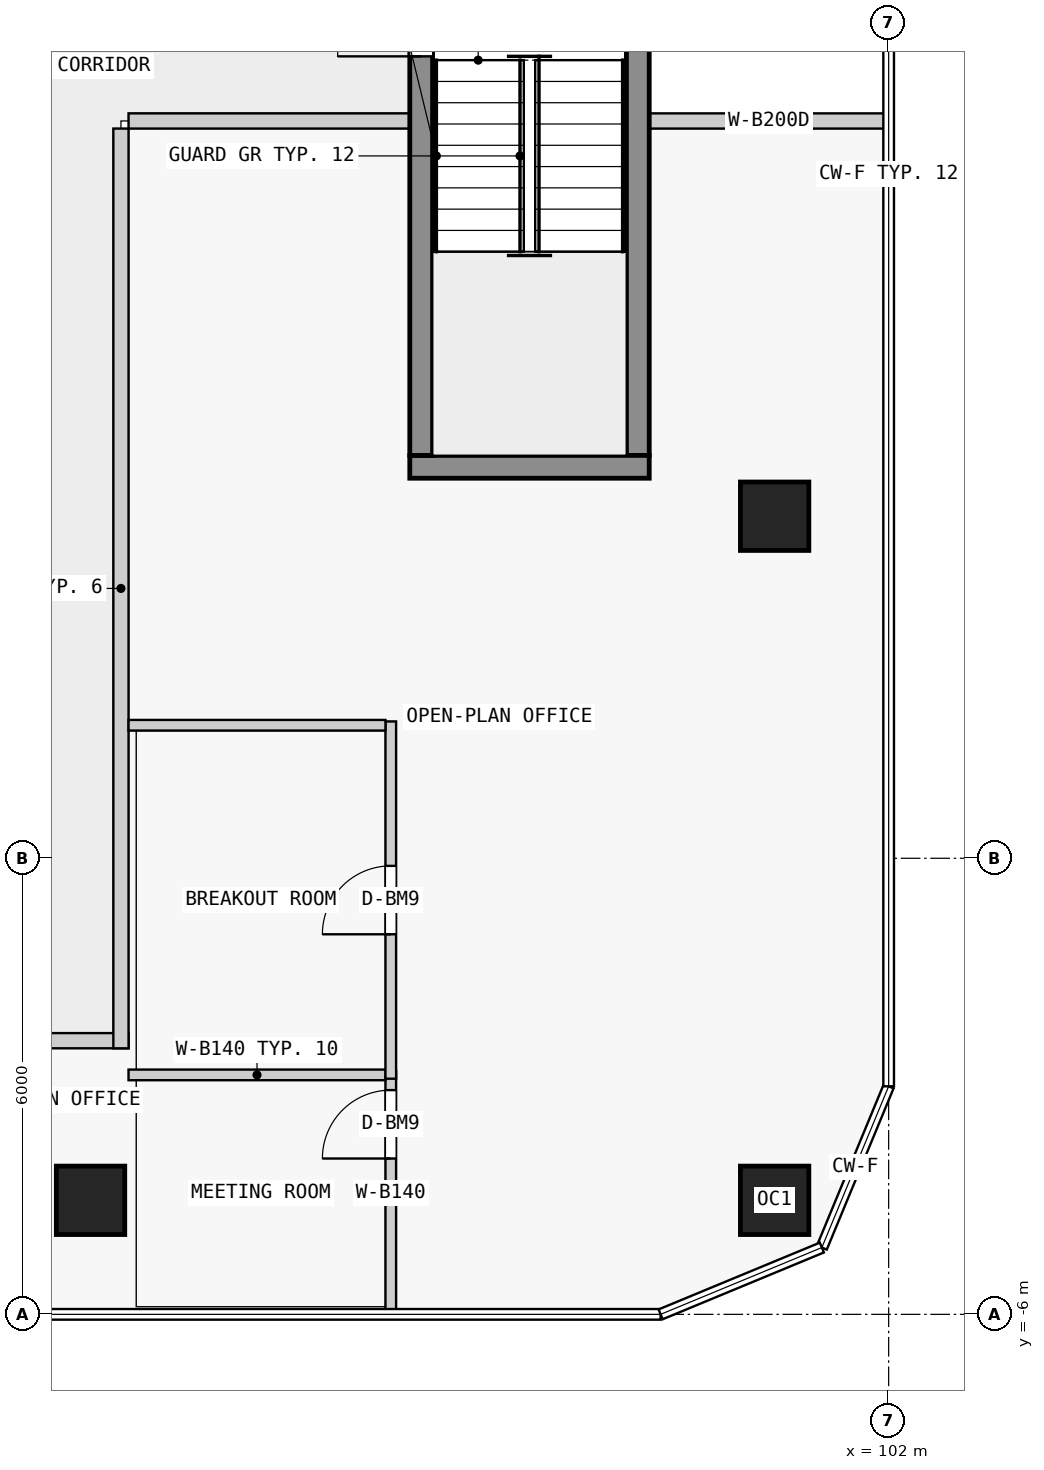
"""IFC4 building model, lengths in metres.
Left out: names, types, materials, properties, quantities, classifications, styles, units other than length and angle.
Written with IfcOpenShell. Run it as: python <this file> out.ifc"""

import sys

from ifc_helpers import new_model, si_unit, direction, frame, frame_2d, origin, origin_2d, place, context, subcontext, project, spatial, rectangle, extrude, element, fill, save


model = new_model("IFC4")
c1 = context("Model", 3, precision=1e-05, world=origin(), true_north=direction((0.0, 1.0)))
c2 = subcontext(c1, "Body", "Model", "MODEL_VIEW")
j1 = project(units=[si_unit("LENGTHUNIT", "METRE"), si_unit("PLANEANGLEUNIT", "RADIAN")], contexts=[c1])
p1 = place(None, origin())
s1 = spatial("IfcSite", under=j1, at=p1, CompositionType="ELEMENT")
p2 = place(p1, origin())
s2 = spatial("IfcBuilding", under=s1, at=p2, CompositionType="ELEMENT")
p3 = place(p2, frame((0.0, 0.0, 68.8)))
s3 = spatial("IfcBuildingStorey", under=s2, at=p3, CompositionType="ELEMENT", Elevation=68.8)
for number, where, z_axis, x_axis in (
    (1, (91.5, -4.5, 0.0), (0.0, 0.0, 1.0), (1.0, 0.0, 0.0)),
    (2, (100.5, -4.5, 0.0), (0.0, 0.0, 1.0), (1.0, 0.0, 0.0)),
    (3, (100.5, 4.5, 0.0), (0.0, 0.0, 1.0), (1.0, 0.0, 0.0)),
):
    element("IfcColumn", number, at=place(p3, frame(where, z_axis=z_axis, x_axis=x_axis)), inside=s3, PredefinedType="COLUMN", context=c2, shape_type="SweptSolid", body=[
        extrude(rectangle(XDim=0.9, YDim=0.9, at=origin_2d()), origin(), (0.0, 0.0, 1.0), 3.5),
    ])
p4 = place(p3, frame((95.85, 5.3, 0.0), z_axis=(0.0, 0.0, 1.0), x_axis=(0.0, 1.0, 0.0)))
e4 = element("IfcWall", 4, at=p4, inside=s3, PredefinedType="SHEAR", context=c2, shape_type="SweptSolid", body=[
    extrude(rectangle(XDim=6.4, YDim=0.3, at=frame_2d((3.2, 0.0))), origin(), (0.0, 0.0, 1.0), 3.2),
])
p5 = place(p4, frame((5.25, 0.0, 0.0)))
e5 = element("IfcOpeningElement", 5, at=p5, cuts=e4, PredefinedType="OPENING", context=c2, shape_type="SweptSolid", body=[
    extrude(rectangle(XDim=1.1, YDim=2.1, at=frame_2d((0.55, 1.05))), frame((0.0, 0.16, 0.0), z_axis=(0.0, -1.0, 0.0), x_axis=(1.0, 0.0, 0.0)), (0.0, 0.0, 1.0), 0.32),
])
p6 = place(p3, frame((98.7, 5.3, 0.0), z_axis=(0.0, 0.0, 1.0), x_axis=(0.0, 1.0, 0.0)))
e6 = element("IfcWall", 6, at=p6, inside=s3, PredefinedType="SHEAR", context=c2, shape_type="SweptSolid", body=[
    extrude(rectangle(XDim=6.4, YDim=0.3, at=frame_2d((3.2, 0.0))), origin(), (0.0, 0.0, 1.0), 3.2),
])
p7 = place(p3, frame((95.7, 5.15, 0.0), z_axis=(0.0, 0.0, 1.0), x_axis=(1.0, 0.0, 0.0)))
e7 = element("IfcWall", 7, at=p7, inside=s3, PredefinedType="SHEAR", context=c2, shape_type="SweptSolid", body=[
    extrude(rectangle(XDim=3.15, YDim=0.3, at=frame_2d((1.575, 0.0))), origin(), (0.0, 0.0, 1.0), 3.2),
])
p8 = place(p3, frame((72.0, -2.4, 0.0), z_axis=(0.0, 0.0, 1.0), x_axis=(1.0, 0.0, 0.0)))
e8 = element("IfcWall", 8, at=p8, inside=s3, PredefinedType="PARTITIONING", context=c2, shape_type="SweptSolid", body=[
    extrude(rectangle(XDim=20.0, YDim=0.2, at=frame_2d((10.0, 0.0))), origin(), (0.0, 0.0, 1.0), 3.2),
])
p9 = place(p8, frame((11.3, 0.0, 0.0)))
e9 = element("IfcOpeningElement", 9, at=p9, cuts=e8, PredefinedType="OPENING", context=c2, shape_type="SweptSolid", body=[
    extrude(rectangle(XDim=1.4, YDim=2.4, at=frame_2d((0.7, 1.2))), frame((0.0, 0.11, 0.0), z_axis=(0.0, -1.0, 0.0), x_axis=(1.0, 0.0, 0.0)), (0.0, 0.0, 1.0), 0.22),
])
p10 = place(p3, frame((91.9, -2.5, 0.0), z_axis=(0.0, 0.0, 1.0), x_axis=(0.0, 1.0, 0.0)))
e10 = element("IfcWall", 10, at=p10, inside=s3, PredefinedType="PARTITIONING", context=c2, shape_type="SweptSolid", body=[
    extrude(rectangle(XDim=12.1, YDim=0.2, at=frame_2d((6.05, 0.0))), origin(), (0.0, 0.0, 1.0), 3.2),
])
p11 = place(p3, frame((92.0, 9.7, 0.0), z_axis=(0.0, 0.0, 1.0), x_axis=(1.0, 0.0, 0.0)))
e11 = element("IfcWall", 11, at=p11, inside=s3, PredefinedType="PARTITIONING", context=c2, shape_type="SweptSolid", body=[
    extrude(rectangle(XDim=3.7, YDim=0.2, at=frame_2d((1.85, 0.0))), origin(), (0.0, 0.0, 1.0), 3.2),
])
p12 = place(p3, frame((98.85, 9.7, 0.0), z_axis=(0.0, 0.0, 1.0), x_axis=(1.0, 0.0, 0.0)))
e12 = element("IfcWall", 12, at=p12, inside=s3, PredefinedType="PARTITIONING", context=c2, shape_type="SweptSolid", body=[
    extrude(rectangle(XDim=3.15, YDim=0.2, at=frame_2d((1.575, 0.0))), origin(), (0.0, 0.0, 1.0), 3.2),
])
p13 = place(p3, frame((95.45, -6.0, 0.0), z_axis=(0.0, 0.0, 1.0), x_axis=(0.0, 1.0, 0.0)))
e13 = element("IfcWall", 13, at=p13, inside=s3, PredefinedType="PARTITIONING", context=c2, shape_type="SweptSolid", body=[
    extrude(rectangle(XDim=3.2, YDim=0.14, at=frame_2d((1.6, 0.0))), origin(), (0.0, 0.0, 1.0), 3.2),
])
p14 = place(p13, frame((2.05, 0.0, 0.0)))
e14 = element("IfcOpeningElement", 14, at=p14, cuts=e13, PredefinedType="OPENING", context=c2, shape_type="SweptSolid", body=[
    extrude(rectangle(XDim=0.9, YDim=2.4, at=frame_2d((0.45, 1.2))), frame((0.0, 0.08, 0.0), z_axis=(0.0, -1.0, 0.0), x_axis=(1.0, 0.0, 0.0)), (0.0, 0.0, 1.0), 0.16),
])
p15 = place(p3, frame((92.0, -2.85, 0.0), z_axis=(0.0, 0.0, 1.0), x_axis=(1.0, 0.0, 0.0)))
e15 = element("IfcWall", 15, at=p15, inside=s3, PredefinedType="PARTITIONING", context=c2, shape_type="SweptSolid", body=[
    extrude(rectangle(XDim=3.38, YDim=0.14, at=frame_2d((1.69, 0.0))), origin(), (0.0, 0.0, 1.0), 3.2),
])
p16 = place(p3, frame((95.45, -2.9, 0.0), z_axis=(0.0, 0.0, 1.0), x_axis=(0.0, 1.0, 0.0)))
e16 = element("IfcWall", 16, at=p16, inside=s3, PredefinedType="PARTITIONING", context=c2, shape_type="SweptSolid", body=[
    extrude(rectangle(XDim=4.7, YDim=0.14, at=frame_2d((2.35, 0.0))), origin(), (0.0, 0.0, 1.0), 3.2),
])
p17 = place(p16, frame((1.9, 0.0, 0.0)))
e17 = element("IfcOpeningElement", 17, at=p17, cuts=e16, PredefinedType="OPENING", context=c2, shape_type="SweptSolid", body=[
    extrude(rectangle(XDim=0.9, YDim=2.4, at=frame_2d((0.45, 1.2))), frame((0.0, 0.08, 0.0), z_axis=(0.0, -1.0, 0.0), x_axis=(1.0, 0.0, 0.0)), (0.0, 0.0, 1.0), 0.16),
])
p18 = place(p3, frame((92.0, 1.75, 0.0), z_axis=(0.0, 0.0, 1.0), x_axis=(1.0, 0.0, 0.0)))
e18 = element("IfcWall", 18, at=p18, inside=s3, PredefinedType="PARTITIONING", context=c2, shape_type="SweptSolid", body=[
    extrude(rectangle(XDim=3.38, YDim=0.14, at=frame_2d((1.69, 0.0))), origin(), (0.0, 0.0, 1.0), 3.2),
])
p19 = place(p5, origin())
e19 = element("IfcDoor", 19, at=p19, inside=s3, OperationType="SINGLE_SWING_LEFT", PredefinedType="DOOR", context=c2, shape_type="SweptSolid", body=[
    extrude(rectangle(XDim=1.1, YDim=2.1, at=frame_2d((0.55, 1.05))), frame((0.0, 0.025, 0.0), z_axis=(0.0, -1.0, 0.0), x_axis=(1.0, 0.0, 0.0)), (0.0, 0.0, 1.0), 0.05),
])
fill(e5, e19)
p20 = place(p14, origin())
e20 = element("IfcDoor", 20, at=p20, inside=s3, OperationType="SINGLE_SWING_LEFT", PredefinedType="DOOR", context=c2, shape_type="SweptSolid", body=[
    extrude(rectangle(XDim=0.9, YDim=2.4, at=frame_2d((0.45, 1.2))), frame((0.0, 0.025, 0.0), z_axis=(0.0, -1.0, 0.0), x_axis=(1.0, 0.0, 0.0)), (0.0, 0.0, 1.0), 0.05),
])
fill(e14, e20)
p21 = place(p17, origin())
e21 = element("IfcDoor", 21, at=p21, inside=s3, OperationType="SINGLE_SWING_LEFT", PredefinedType="DOOR", context=c2, shape_type="SweptSolid", body=[
    extrude(rectangle(XDim=0.9, YDim=2.4, at=frame_2d((0.45, 1.2))), frame((0.0, 0.025, 0.0), z_axis=(0.0, -1.0, 0.0), x_axis=(1.0, 0.0, 0.0)), (0.0, 0.0, 1.0), 0.05),
])
fill(e17, e21)
save(model, sys.argv[1])
